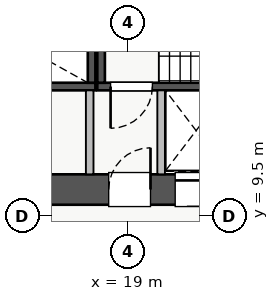
"""IFC4 building model, lengths in metres.
Left out: names, types, materials, properties, quantities, classifications, styles, units other than length and angle.
Written with IfcOpenShell. Run it as: python <this file> out.ifc"""

import sys

from ifc_helpers import new_model, si_unit, direction, frame, frame_2d, origin, place, context, subcontext, project, spatial, rectangle, extrude, source, transform, mapped, element, fill, save


model = new_model("IFC4")
c1 = context("Model", 3, precision=1e-05, world=origin(), true_north=direction((0.0, 1.0)))
c2 = subcontext(c1, "Body", "Model", "MODEL_VIEW")
j1 = project(units=[si_unit("LENGTHUNIT", "METRE"), si_unit("PLANEANGLEUNIT", "RADIAN")], contexts=[c1])
p1 = place(None, origin())
s1 = spatial("IfcSite", under=j1, at=p1, CompositionType="ELEMENT")
p2 = place(p1, origin())
s2 = spatial("IfcBuilding", under=s1, at=p2, CompositionType="ELEMENT")
p3 = place(p2, frame((0.0, 0.0, 23.0)))
s3 = spatial("IfcBuildingStorey", under=s2, at=p3, CompositionType="ELEMENT", Elevation=23.0)
p4 = place(p3, frame((19.88, 12.8, 0.0), z_axis=(0.0, 0.0, 1.0), x_axis=(1.0, 0.0, 0.0)))
e1 = element("IfcWall", 1, at=p4, inside=s3, PredefinedType="SHEAR", context=c2, shape_type="SweptSolid", body=[
    extrude(rectangle(XDim=1.87, YDim=0.18, at=frame_2d((0.935, 0.0))), origin(), (0.0, 0.0, 1.0), 3.07),
])
p5 = place(p3, frame((11.0, 12.91, 0.0), z_axis=(0.0, 0.0, 1.0), x_axis=(1.0, 0.0, 0.0)))
e2 = element("IfcWall", 2, at=p5, inside=s3, PredefinedType="SHEAR", context=c2, shape_type="SweptSolid", body=[
    extrude(rectangle(XDim=7.15, YDim=0.2, at=frame_2d((3.575, 0.0))), origin(), (0.0, 0.0, 1.0), 3.25),
])
p6 = place(p5, frame((0.35, 0.0, 0.0)))
e3 = element("IfcOpeningElement", 3, at=p6, cuts=e2, PredefinedType="OPENING", context=c2, shape_type="SweptSolid", body=[
    extrude(rectangle(XDim=1.1, YDim=2.05, at=frame_2d((0.55, 1.025))), frame((0.0, 0.11, 0.0), z_axis=(0.0, -1.0, 0.0), x_axis=(1.0, 0.0, 0.0)), (0.0, 0.0, 1.0), 0.22),
])
p7 = place(p3, frame((18.05, 13.01, 0.0), z_axis=(0.0, 0.0, 1.0), x_axis=(0.0, 1.0, 0.0)))
e4 = element("IfcWall", 4, at=p7, inside=s3, PredefinedType="SHEAR", context=c2, shape_type="SweptSolid", body=[
    extrude(rectangle(XDim=2.94, YDim=0.2, at=frame_2d((1.47, 0.0))), origin(), (0.0, 0.0, 1.0), 3.25),
])
p8 = place(p3, frame((18.2, 12.91, 0.0), z_axis=(0.0, 0.0, 1.0), x_axis=(1.0, 0.0, 0.0)))
e5 = element("IfcWall", 5, at=p8, inside=s3, PredefinedType="SHEAR", context=c2, shape_type="SweptSolid", body=[
    extrude(rectangle(XDim=7.15, YDim=0.2, at=frame_2d((3.575, 0.0))), origin(), (0.0, 0.0, 1.0), 3.25),
])
p9 = place(p8, frame((0.35, 0.0, 0.0)))
e6 = element("IfcOpeningElement", 6, at=p9, cuts=e5, PredefinedType="OPENING", context=c2, shape_type="SweptSolid", body=[
    extrude(rectangle(XDim=1.1, YDim=2.05, at=frame_2d((0.55, 1.025))), frame((0.0, 0.11, 0.0), z_axis=(0.0, -1.0, 0.0), x_axis=(1.0, 0.0, 0.0)), (0.0, 0.0, 1.0), 0.22),
])
p10 = place(p3, frame((18.3, 13.01, 0.0), z_axis=(0.0, 0.0, 1.0), x_axis=(0.0, 1.0, 0.0)))
e7 = element("IfcWall", 7, at=p10, inside=s3, PredefinedType="SHEAR", context=c2, shape_type="SweptSolid", body=[
    extrude(rectangle(XDim=2.94, YDim=0.2, at=frame_2d((1.47, 0.0))), origin(), (0.0, 0.0, 1.0), 3.25),
])
p11 = place(p3, frame((10.2, 10.2, 0.0), z_axis=(0.0, 0.0, 1.0), x_axis=(1.0, 0.0, 0.0)))
e8 = element("IfcWall", 8, at=p11, inside=s3, PredefinedType="SHEAR", context=c2, shape_type="SweptSolid", body=[
    extrude(rectangle(XDim=17.6, YDim=0.8, at=frame_2d((8.8, 0.0))), origin(), (0.0, 0.0, 1.0), 3.25),
])
p12 = place(p11, frame((1.15, 0.0, 0.0)))
e9 = element("IfcOpeningElement", 9, at=p12, cuts=e8, PredefinedType="OPENING", context=c2, shape_type="SweptSolid", body=[
    extrude(rectangle(XDim=1.1, YDim=2.05, at=frame_2d((0.55, 1.025))), frame((0.0, 0.41, 0.0), z_axis=(0.0, -1.0, 0.0), x_axis=(1.0, 0.0, 0.0)), (0.0, 0.0, 1.0), 0.82),
])
p13 = place(p11, frame((8.3, 0.0, 0.0)))
e10 = element("IfcOpeningElement", 10, at=p13, cuts=e8, PredefinedType="OPENING", context=c2, shape_type="SweptSolid", body=[
    extrude(rectangle(XDim=1.1, YDim=2.05, at=frame_2d((0.55, 1.025))), frame((0.0, 0.41, 0.0), z_axis=(0.0, -1.0, 0.0), x_axis=(1.0, 0.0, 0.0)), (0.0, 0.0, 1.0), 0.82),
])
p14 = place(p11, frame((10.05, 0.0, 0.0)))
e11 = element("IfcOpeningElement", 11, at=p14, cuts=e8, PredefinedType="OPENING", context=c2, shape_type="SweptSolid", body=[
    extrude(rectangle(XDim=1.1, YDim=2.05, at=frame_2d((0.55, 1.025))), frame((0.0, 0.41, 0.0), z_axis=(0.0, -1.0, 0.0), x_axis=(1.0, 0.0, 0.0)), (0.0, 0.0, 1.0), 0.82),
])
p15 = place(p11, frame((14.74, 0.0, 0.0)))
e12 = element("IfcOpeningElement", 12, at=p15, cuts=e8, PredefinedType="OPENING", context=c2, shape_type="SweptSolid", body=[
    extrude(rectangle(XDim=1.0, YDim=2.05, at=frame_2d((0.5, 1.025))), frame((0.0, 0.41, 0.0), z_axis=(0.0, -1.0, 0.0), x_axis=(1.0, 0.0, 0.0)), (0.0, 0.0, 1.0), 0.82),
])
p16 = place(p11, frame((11.835, 0.0, 0.0)))
e13 = element("IfcOpeningElement", 13, at=p16, cuts=e8, PredefinedType="OPENING", context=c2, shape_type="SweptSolid", body=[
    extrude(rectangle(XDim=1.0, YDim=2.05, at=frame_2d((0.5, 1.025))), frame((0.0, 0.41, 0.0), z_axis=(0.0, -1.0, 0.0), x_axis=(1.0, 0.0, 0.0)), (0.0, 0.0, 1.0), 0.82),
])
p17 = place(p11, frame((13.37, 0.0, 0.0)))
e14 = element("IfcOpeningElement", 14, at=p17, cuts=e8, PredefinedType="OPENING", context=c2, shape_type="SweptSolid", body=[
    extrude(rectangle(XDim=1.0, YDim=2.05, at=frame_2d((0.5, 1.025))), frame((0.0, 0.41, 0.0), z_axis=(0.0, -1.0, 0.0), x_axis=(1.0, 0.0, 0.0)), (0.0, 0.0, 1.0), 0.82),
])
for number, where, z_axis, x_axis in (
    (15, (18.0, 10.6, 0.0), (0.0, 0.0, 1.0), (0.0, 1.0, 0.0)),
    (16, (19.88, 10.6, 0.0), (0.0, 0.0, 1.0), (0.0, 1.0, 0.0)),
):
    element("IfcWall", number, at=place(p3, frame(where, z_axis=z_axis, x_axis=x_axis)), inside=s3, PredefinedType="PARTITIONING", context=c2, shape_type="SweptSolid", body=[
        extrude(rectangle(XDim=2.21, YDim=0.2, at=frame_2d((1.105, 0.0))), origin(), (0.0, 0.0, 1.0), 3.07),
    ])
m1 = source(origin(), c2, "Body", "SweptSolid", [
    extrude(rectangle(XDim=1.1, YDim=2.05, at=frame_2d((0.55, 1.025))), frame((0.0, 0.025, 0.0), z_axis=(0.0, -1.0, 0.0), x_axis=(1.0, 0.0, 0.0)), (0.0, 0.0, 1.0), 0.05),
])
p18 = place(p13, origin())
e17 = element("IfcDoor", 17, at=p18, inside=s3, OperationType="SINGLE_SWING_RIGHT", PredefinedType="DOOR", context=c2, shape_type="MappedRepresentation", body=[
    mapped(m1, transform((0.0, 0.0, 0.0), x_axis=(1.0, 0.0, 0.0), y_axis=(0.0, 1.0, 0.0), z_axis=(0.0, 0.0, 1.0), scale=1.0)),
])
fill(e10, e17)
p19 = place(p9, frame((1.1, 0.0, 0.0), z_axis=(0.0, 0.0, 1.0), x_axis=(-1.0, 0.0, 0.0)))
e18 = element("IfcDoor", 18, at=p19, inside=s3, OperationType="SINGLE_SWING_LEFT", PredefinedType="DOOR", context=c2, shape_type="MappedRepresentation", body=[
    mapped(m1, transform((0.0, 0.0, 0.0), x_axis=(1.0, 0.0, 0.0), y_axis=(0.0, 1.0, 0.0), z_axis=(0.0, 0.0, 1.0), scale=1.0)),
])
fill(e6, e18)
p20 = place(p14, origin())
e19 = element("IfcDoor", 19, at=p20, inside=s3, OperationType="SLIDING_TO_RIGHT", PredefinedType="DOOR", context=c2, shape_type="MappedRepresentation", body=[
    mapped(m1, transform((0.0, 0.0, 0.0), x_axis=(1.0, 0.0, 0.0), y_axis=(0.0, 1.0, 0.0), z_axis=(0.0, 0.0, 1.0), scale=1.0)),
])
fill(e11, e19)
save(model, sys.argv[1])
